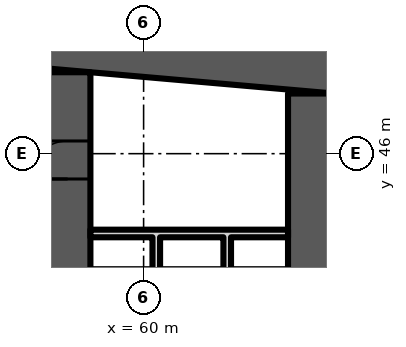
"""IFC4 building model, lengths in metres.
Left out: names, types, materials, properties, quantities, classifications, styles, units other than length and angle.
Written with IfcOpenShell. Run it as: python <this file> out.ifc"""

import sys

from ifc_helpers import new_model, si_unit, direction, frame, frame_2d, origin, place, context, subcontext, project, spatial, polyline, rectangle, outline, extrude, element, fill, save


model = new_model("IFC4")
c1 = context("Model", 3, precision=1e-05, world=origin(), true_north=direction((0.0, 1.0)))
c2 = subcontext(c1, "Body", "Model", "MODEL_VIEW")
j1 = project(units=[si_unit("LENGTHUNIT", "METRE"), si_unit("PLANEANGLEUNIT", "RADIAN")], contexts=[c1])
p1 = place(None, origin())
s1 = spatial("IfcSite", under=j1, at=p1, CompositionType="ELEMENT")
p2 = place(p1, origin())
s2 = spatial("IfcBuilding", under=s1, at=p2, CompositionType="ELEMENT")
p3 = place(p2, frame((0.0, 0.0, 59.5)))
s3 = spatial("IfcBuildingStorey", under=s2, at=p3, CompositionType="ELEMENT", Elevation=59.5)
p4 = place(p3, origin())
e1 = element("IfcWall", 1, at=p4, inside=s3, PredefinedType="SHEAR", context=c2, shape_type="SweptSolid", body=[
    extrude(outline(polyline([(9.0, 47.583), (37.0, 50.032), (65.0, 47.583), (65.0, 48.787), (37.0, 51.237), (9.0, 48.787), (9.0, 47.583)])), origin(), (0.0, 0.0, 1.0), 3.6),
])
p5 = place(p3, frame((58.0, 35.2, 0.0), z_axis=(0.0, 0.0, 1.0), x_axis=(0.0, 1.0, 0.0)))
e2 = element("IfcWall", 2, at=p5, inside=s3, PredefinedType="SHEAR", context=c2, shape_type="SweptSolid", body=[
    extrude(rectangle(XDim=12.943, YDim=1.2, at=frame_2d((6.471, 0.0))), origin(), (0.0, 0.0, 1.0), 3.6),
])
p6 = place(p5, frame((10.134, 0.0, 0.0)))
e3 = element("IfcOpeningElement", 3, at=p6, cuts=e2, PredefinedType="OPENING", context=c2, shape_type="SweptSolid", body=[
    extrude(rectangle(XDim=1.0, YDim=2.1, at=frame_2d((0.5, 1.05))), frame((0.0, 0.61, 0.0), z_axis=(0.0, -1.0, 0.0), x_axis=(1.0, 0.0, 0.0)), (0.0, 0.0, 1.0), 1.22),
])
p7 = place(p5, frame((3.2, 0.0, 0.0)))
e4 = element("IfcOpeningElement", 4, at=p7, cuts=e2, PredefinedType="OPENING", context=c2, shape_type="SweptSolid", body=[
    extrude(rectangle(XDim=1.1, YDim=2.1, at=frame_2d((0.55, 1.05))), frame((0.0, 0.61, 0.0), z_axis=(0.0, -1.0, 0.0), x_axis=(1.0, 0.0, 0.0)), (0.0, 0.0, 1.0), 1.22),
])
p8 = place(p3, frame((64.4, 35.2, 0.0), z_axis=(0.0, 0.0, 1.0), x_axis=(0.0, 1.0, 0.0)))
e5 = element("IfcWall", 5, at=p8, inside=s3, PredefinedType="SHEAR", context=c2, shape_type="SweptSolid", body=[
    extrude(rectangle(XDim=12.383, YDim=1.2, at=frame_2d((6.191, 0.0))), origin(), (0.0, 0.0, 1.0), 3.6),
])
p9 = place(p3, frame((0.0, 0.0, -0.0)))
e6 = element("IfcWall", 6, at=p9, inside=s3, PredefinedType="PARTITIONING", context=c2, shape_type="SweptSolid", body=[
    extrude(outline(polyline([(60.433, 40.8), (60.233, 40.8), (60.233, 43.8), (58.6, 43.8), (58.6, 44.0), (63.8, 44.0), (63.8, 43.8), (62.3, 43.8), (62.3, 40.8), (62.1, 40.8), (62.1, 43.8), (60.433, 43.8), (60.433, 40.8)])), origin(), (0.0, 0.0, 1.0), 3.2),
])
p10 = place(p6, origin())
e7 = element("IfcDoor", 7, at=p10, inside=s3, OperationType="SINGLE_SWING_LEFT", PredefinedType="DOOR", context=c2, shape_type="SweptSolid", body=[
    extrude(rectangle(XDim=1.0, YDim=2.1, at=frame_2d((0.5, 1.05))), frame((0.0, 0.6, 0.0), z_axis=(0.0, -1.0, 0.0), x_axis=(1.0, 0.0, 0.0)), (0.0, 0.0, 1.0), 1.199),
])
fill(e3, e7)
save(model, sys.argv[1])
